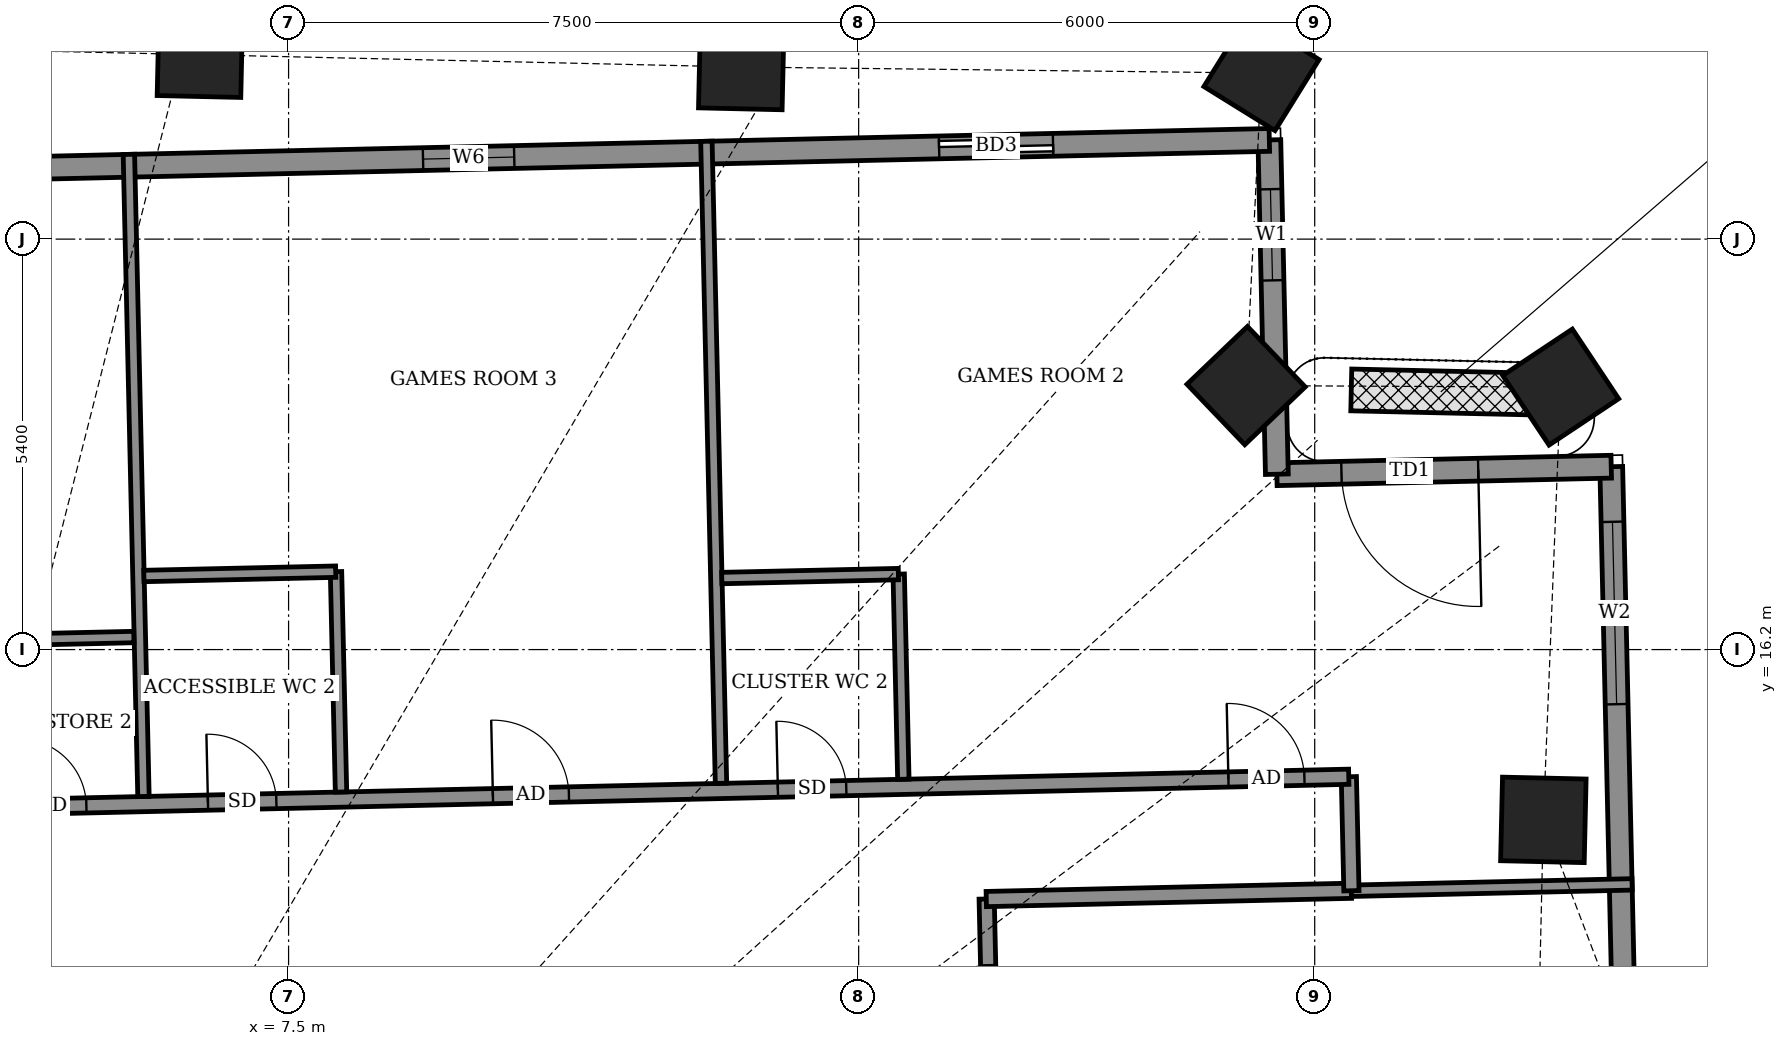
"""IFC4 building model, lengths in metres.
Left out: names, types, materials, properties, quantities, classifications, styles, units other than length and angle.
Written with IfcOpenShell. Run it as: python <this file> out.ifc"""

import sys

from ifc_helpers import new_model, si_unit, direction, frame, frame_2d, origin, origin_2d, place, context, subcontext, project, spatial, rectangle, extrude, element, fill, save


model = new_model("IFC4")
c1 = context("Model", 3, precision=1e-05, world=origin(), true_north=direction((0.0, 1.0)))
c2 = subcontext(c1, "Body", "Model", "MODEL_VIEW")
j1 = project(units=[si_unit("LENGTHUNIT", "METRE"), si_unit("PLANEANGLEUNIT", "RADIAN")], contexts=[c1])
p1 = place(None, origin())
s1 = spatial("IfcSite", under=j1, at=p1, CompositionType="ELEMENT")
p2 = place(p1, origin())
s2 = spatial("IfcBuilding", under=s1, at=p2, CompositionType="ELEMENT")
p3 = place(p2, frame((0.0, 0.0, 226.5)))
s3 = spatial("IfcBuildingStorey", under=s2, at=p3, CompositionType="ELEMENT", Elevation=226.5)
for number, where, z_axis, x_axis in (
    (1, (24.008, 13.959, -0.55), (0.0, 0.0, 1.0), (0.023, 1.0, 0.0)),
    (2, (24.236, 19.653, -0.55), (0.0, 0.0, 1.0), (-0.554, 0.833, 0.0)),
    (3, (20.097, 19.673, -0.55), (0.0, 0.0, 1.0), (-0.691, 0.723, 0.0)),
    (4, (20.3, 23.785, -0.55), (0.0, 0.0, 1.0), (-0.85, 0.527, 0.0)),
    (5, (13.456, 23.864, -0.55), (0.0, 0.0, 1.0), (-1.0, 0.023, 0.0)),
    (6, (6.333, 24.026, -0.55), (0.0, 0.0, 1.0), (-1.0, 0.023, 0.0)),
):
    element("IfcColumn", number, at=place(p3, frame(where, z_axis=z_axis, x_axis=x_axis)), inside=s3, PredefinedType="COLUMN", context=c2, shape_type="SweptSolid", body=[
        extrude(rectangle(XDim=1.1, YDim=1.1, at=origin_2d()), origin(), (0.0, 0.0, 1.0), 4.6),
    ])
p4 = place(p3, frame((25.194, 5.703, 0.0), z_axis=(0.0, 0.0, 1.0), x_axis=(-0.022718397506, 0.999741903901, 0.0)))
e7 = element("IfcWall", 7, at=p4, inside=s3, PredefinedType="SOLIDWALL", context=c2, shape_type="SweptSolid", body=[
    extrude(rectangle(XDim=12.906, YDim=0.3, at=frame_2d((6.453, 0.0))), origin(), (0.0, 0.0, 1.0), 2.55),
])
p5 = place(p4, frame((4.253, 0.0, 0.0)))
e8 = element("IfcOpeningElement", 8, at=p5, cuts=e7, PredefinedType="OPENING", context=c2, shape_type="SweptSolid", body=[
    extrude(rectangle(XDim=1.5, YDim=2.4, at=frame_2d((0.75, 1.2))), frame((0.0, 0.16, 0.0), z_axis=(0.0, -1.0, 0.0), x_axis=(1.0, 0.0, 0.0)), (0.0, 0.0, 1.0), 0.32),
])
p6 = place(p4, frame((9.781, 0.0, 0.9)))
e9 = element("IfcOpeningElement", 9, at=p6, cuts=e7, PredefinedType="OPENING", context=c2, shape_type="SweptSolid", body=[
    extrude(rectangle(XDim=2.4, YDim=1.5, at=frame_2d((1.2, 0.75))), frame((0.0, 0.16, 0.0), z_axis=(0.0, -1.0, 0.0), x_axis=(1.0, 0.0, 0.0)), (0.0, 0.0, 1.0), 0.32),
])
p7 = place(p3, frame((24.901, 18.606, 0.0), z_axis=(0.0, 0.0, 1.0), x_axis=(-0.999747476176, -0.022471846368, 0.0)))
e10 = element("IfcWall", 10, at=p7, inside=s3, PredefinedType="SOLIDWALL", context=c2, shape_type="SweptSolid", body=[
    extrude(rectangle(XDim=4.4, YDim=0.3, at=frame_2d((2.2, 0.0))), origin(), (0.0, 0.0, 1.0), 2.55),
])
p8 = place(p7, frame((1.75, 0.0, 0.0)))
e11 = element("IfcOpeningElement", 11, at=p8, cuts=e10, PredefinedType="OPENING", context=c2, shape_type="SweptSolid", body=[
    extrude(rectangle(XDim=1.8, YDim=2.4, at=frame_2d((0.9, 1.2))), frame((0.0, 0.16, 0.0), z_axis=(0.0, -1.0, 0.0), x_axis=(1.0, 0.0, 0.0)), (0.0, 0.0, 1.0), 0.32),
])
p9 = place(p3, frame((20.502, 18.507, 0.0), z_axis=(0.0, 0.0, 1.0), x_axis=(-0.02247683371, 0.999747364061, 0.0)))
e12 = element("IfcWall", 12, at=p9, inside=s3, PredefinedType="SOLIDWALL", context=c2, shape_type="SweptSolid", body=[
    extrude(rectangle(XDim=4.399, YDim=0.3, at=frame_2d((2.2, 0.0))), origin(), (0.0, 0.0, 1.0), 2.55),
])
p10 = place(p9, frame((2.551, 0.0, 0.9)))
e13 = element("IfcOpeningElement", 13, at=p10, cuts=e12, PredefinedType="OPENING", context=c2, shape_type="SweptSolid", body=[
    extrude(rectangle(XDim=1.2, YDim=1.5, at=frame_2d((0.6, 0.75))), frame((0.0, 0.16, 0.0), z_axis=(0.0, -1.0, 0.0), x_axis=(1.0, 0.0, 0.0)), (0.0, 0.0, 1.0), 0.32),
])
p11 = place(p3, frame((20.403, 22.905, 0.0), z_axis=(0.0, 0.0, 1.0), x_axis=(-0.99974298964, -0.022670568288, 0.0)))
e14 = element("IfcWall", 14, at=p11, inside=s3, PredefinedType="SOLIDWALL", context=c2, shape_type="SweptSolid", body=[
    extrude(rectangle(XDim=44.509, YDim=0.3, at=frame_2d((22.254, 0.0))), origin(), (0.0, 0.0, 1.0), 2.45),
])
p12 = place(p11, frame((2.846, 0.0, 0.0)))
e15 = element("IfcOpeningElement", 15, at=p12, cuts=e14, PredefinedType="OPENING", context=c2, shape_type="SweptSolid", body=[
    extrude(rectangle(XDim=1.5, YDim=2.0, at=frame_2d((0.75, 1.0))), frame((0.0, 0.16, 0.0), z_axis=(0.0, -1.0, 0.0), x_axis=(1.0, 0.0, 0.0)), (0.0, 0.0, 1.0), 0.32),
])
p13 = place(p11, frame((9.937, 0.0, 0.5)))
e16 = element("IfcOpeningElement", 16, at=p13, cuts=e14, PredefinedType="OPENING", context=c2, shape_type="SweptSolid", body=[
    extrude(rectangle(XDim=1.2, YDim=1.1, at=frame_2d((0.6, 0.55))), frame((0.0, 0.16, 0.0), z_axis=(0.0, -1.0, 0.0), x_axis=(1.0, 0.0, 0.0)), (0.0, 0.0, 1.0), 0.32),
])
p14 = place(p11, frame((17.433, 0.0, 0.5)))
e17 = element("IfcOpeningElement", 17, at=p14, cuts=e14, PredefinedType="OPENING", context=c2, shape_type="SweptSolid", body=[
    extrude(rectangle(XDim=1.2, YDim=1.1, at=frame_2d((0.6, 0.55))), frame((0.0, 0.16, 0.0), z_axis=(0.0, -1.0, 0.0), x_axis=(1.0, 0.0, 0.0)), (0.0, 0.0, 1.0), 0.32),
])
p15 = place(p11, frame((22.808, 0.0, 0.0)))
e18 = element("IfcOpeningElement", 18, at=p15, cuts=e14, PredefinedType="OPENING", context=c2, shape_type="SweptSolid", body=[
    extrude(rectangle(XDim=1.5, YDim=2.0, at=frame_2d((0.75, 1.0))), frame((0.0, 0.16, 0.0), z_axis=(0.0, -1.0, 0.0), x_axis=(1.0, 0.0, 0.0)), (0.0, 0.0, 1.0), 0.32),
])
p16 = place(p11, frame((27.808, 0.0, 0.0)))
e19 = element("IfcOpeningElement", 19, at=p16, cuts=e14, PredefinedType="OPENING", context=c2, shape_type="SweptSolid", body=[
    extrude(rectangle(XDim=1.5, YDim=2.0, at=frame_2d((0.75, 1.0))), frame((0.0, 0.16, 0.0), z_axis=(0.0, -1.0, 0.0), x_axis=(1.0, 0.0, 0.0)), (0.0, 0.0, 1.0), 0.32),
])
p17 = place(p11, frame((33.483, 0.0, 0.5)))
e20 = element("IfcOpeningElement", 20, at=p17, cuts=e14, PredefinedType="OPENING", context=c2, shape_type="SweptSolid", body=[
    extrude(rectangle(XDim=1.2, YDim=1.1, at=frame_2d((0.6, 0.55))), frame((0.0, 0.16, 0.0), z_axis=(0.0, -1.0, 0.0), x_axis=(1.0, 0.0, 0.0)), (0.0, 0.0, 1.0), 0.32),
])
p18 = place(p11, frame((40.283, 0.0, 0.5)))
e21 = element("IfcOpeningElement", 21, at=p18, cuts=e14, PredefinedType="OPENING", context=c2, shape_type="SweptSolid", body=[
    extrude(rectangle(XDim=1.2, YDim=1.1, at=frame_2d((0.6, 0.55))), frame((0.0, 0.16, 0.0), z_axis=(0.0, -1.0, 0.0), x_axis=(1.0, 0.0, 0.0)), (0.0, 0.0, 1.0), 0.32),
])
p19 = place(p3, frame((21.481, 19.616, 0.0), z_axis=(0.0, 0.0, 1.0), x_axis=(0.999746842804, -0.02250000673, 0.0)))
e22 = element("IfcWall", 22, at=p19, inside=s3, PredefinedType="USERDEFINED", context=c2, shape_type="SweptSolid", body=[
    extrude(rectangle(XDim=2.354, YDim=0.55, at=frame_2d((1.177, 0.0))), origin(), (0.0, 0.0, 1.0), 0.8),
])
p20 = place(p3, frame((16.799, 7.875, 0.0), z_axis=(0.0, 0.0, 1.0), x_axis=(-0.022791754614, 0.999740234222, 0.0)))
e23 = element("IfcWall", 23, at=p20, inside=s3, PredefinedType="PARTITIONING", context=c2, shape_type="SweptSolid", body=[
    extrude(rectangle(XDim=5.045, YDim=0.2, at=frame_2d((2.522, 0.0))), origin(), (0.0, 0.0, 1.0), 2.85),
])
p21 = place(p20, frame((3.274, 0.0, 0.0)))
e24 = element("IfcOpeningElement", 24, at=p21, cuts=e23, PredefinedType="OPENING", context=c2, shape_type="SweptSolid", body=[
    extrude(rectangle(XDim=0.9, YDim=2.1, at=frame_2d((0.45, 1.05))), frame((0.0, 0.11, 0.0), z_axis=(0.0, -1.0, 0.0), x_axis=(1.0, 0.0, 0.0)), (0.0, 0.0, 1.0), 0.22),
])
p22 = place(p3, frame((16.679, 12.918, 0.0), z_axis=(0.0, 0.0, 1.0), x_axis=(0.999741966705, 0.022715633565, 0.0)))
e25 = element("IfcWall", 25, at=p22, inside=s3, PredefinedType="PARTITIONING", context=c2, shape_type="SweptSolid", body=[
    extrude(rectangle(XDim=4.804, YDim=0.2, at=frame_2d((2.402, 0.0))), origin(), (0.0, 0.0, 1.0), 2.85),
])
p23 = place(p3, frame((21.482, 13.027, 0.0), z_axis=(0.0, 0.0, 1.0), x_axis=(0.999741664963, 0.022728909705, 0.0)))
e26 = element("IfcWall", 26, at=p23, inside=s3, PredefinedType="PARTITIONING", context=c2, shape_type="SweptSolid", body=[
    extrude(rectangle(XDim=3.695, YDim=0.15, at=frame_2d((1.848, 0.0))), origin(), (0.0, 0.0, 1.0), 2.55),
])
p24 = place(p3, frame((21.483, 13.027, 0.0), z_axis=(0.0, 0.0, 1.0), x_axis=(-0.022617910375, 0.999744182344, 0.0)))
e27 = element("IfcWall", 27, at=p24, inside=s3, PredefinedType="PARTITIONING", context=c2, shape_type="SweptSolid", body=[
    extrude(rectangle(XDim=1.5, YDim=0.2, at=frame_2d((0.75, 0.0))), origin(), (0.0, 0.0, 1.0), 4.05),
])
p25 = place(p3, frame((-27.652, 13.413, 0.0), z_axis=(0.0, 0.0, 1.0), x_axis=(0.999742712492, 0.022682786863, 0.0)))
e28 = element("IfcWall", 28, at=p25, inside=s3, PredefinedType="PARTITIONING", context=c2, shape_type="SweptSolid", body=[
    extrude(rectangle(XDim=49.113, YDim=0.2, at=frame_2d((24.556, 0.0))), origin(), (0.0, 0.0, 1.0), 2.45),
])
p26 = place(p25, frame((47.529, 0.0, 0.0)))
e29 = element("IfcOpeningElement", 29, at=p26, cuts=e28, PredefinedType="OPENING", context=c2, shape_type="SweptSolid", body=[
    extrude(rectangle(XDim=1.0, YDim=2.1, at=frame_2d((0.5, 1.05))), frame((0.0, 0.11, 0.0), z_axis=(0.0, -1.0, 0.0), x_axis=(1.0, 0.0, 0.0)), (0.0, 0.0, 1.0), 0.22),
])
p27 = place(p25, frame((41.6, 0.0, 0.0)))
e30 = element("IfcOpeningElement", 30, at=p27, cuts=e28, PredefinedType="OPENING", context=c2, shape_type="SweptSolid", body=[
    extrude(rectangle(XDim=0.9, YDim=2.1, at=frame_2d((0.45, 1.05))), frame((0.0, 0.11, 0.0), z_axis=(0.0, -1.0, 0.0), x_axis=(1.0, 0.0, 0.0)), (0.0, 0.0, 1.0), 0.22),
])
p28 = place(p25, frame((37.85, 0.0, 0.0)))
e31 = element("IfcOpeningElement", 31, at=p28, cuts=e28, PredefinedType="OPENING", context=c2, shape_type="SweptSolid", body=[
    extrude(rectangle(XDim=1.0, YDim=2.1, at=frame_2d((0.5, 1.05))), frame((0.0, 0.11, 0.0), z_axis=(0.0, -1.0, 0.0), x_axis=(1.0, 0.0, 0.0)), (0.0, 0.0, 1.0), 0.22),
])
p29 = place(p25, frame((34.1, 0.0, 0.0)))
e32 = element("IfcOpeningElement", 32, at=p29, cuts=e28, PredefinedType="OPENING", context=c2, shape_type="SweptSolid", body=[
    extrude(rectangle(XDim=0.9, YDim=2.1, at=frame_2d((0.45, 1.05))), frame((0.0, 0.11, 0.0), z_axis=(0.0, -1.0, 0.0), x_axis=(1.0, 0.0, 0.0)), (0.0, 0.0, 1.0), 0.22),
])
p30 = place(p25, frame((28.525, 0.0, 0.0)))
e33 = element("IfcOpeningElement", 33, at=p30, cuts=e28, PredefinedType="OPENING", context=c2, shape_type="SweptSolid", body=[
    extrude(rectangle(XDim=1.0, YDim=2.1, at=frame_2d((0.5, 1.05))), frame((0.0, 0.11, 0.0), z_axis=(0.0, -1.0, 0.0), x_axis=(1.0, 0.0, 0.0)), (0.0, 0.0, 1.0), 0.22),
])
p31 = place(p25, frame((31.6, 0.0, 0.0)))
e34 = element("IfcOpeningElement", 34, at=p31, cuts=e28, PredefinedType="OPENING", context=c2, shape_type="SweptSolid", body=[
    extrude(rectangle(XDim=0.9, YDim=2.1, at=frame_2d((0.45, 1.05))), frame((0.0, 0.11, 0.0), z_axis=(0.0, -1.0, 0.0), x_axis=(1.0, 0.0, 0.0)), (0.0, 0.0, 1.0), 0.22),
])
p32 = place(p25, frame((25.45, 0.0, 0.0)))
e35 = element("IfcOpeningElement", 35, at=p32, cuts=e28, PredefinedType="OPENING", context=c2, shape_type="SweptSolid", body=[
    extrude(rectangle(XDim=0.9, YDim=2.1, at=frame_2d((0.45, 1.05))), frame((0.0, 0.11, 0.0), z_axis=(0.0, -1.0, 0.0), x_axis=(1.0, 0.0, 0.0)), (0.0, 0.0, 1.0), 0.22),
])
p33 = place(p25, frame((18.05, 0.0, 0.0)))
e36 = element("IfcOpeningElement", 36, at=p33, cuts=e28, PredefinedType="OPENING", context=c2, shape_type="SweptSolid", body=[
    extrude(rectangle(XDim=0.9, YDim=2.1, at=frame_2d((0.45, 1.05))), frame((0.0, 0.11, 0.0), z_axis=(0.0, -1.0, 0.0), x_axis=(1.0, 0.0, 0.0)), (0.0, 0.0, 1.0), 0.22),
])
p34 = place(p25, frame((14.975, 0.0, 0.0)))
e37 = element("IfcOpeningElement", 37, at=p34, cuts=e28, PredefinedType="OPENING", context=c2, shape_type="SweptSolid", body=[
    extrude(rectangle(XDim=1.0, YDim=2.1, at=frame_2d((0.5, 1.05))), frame((0.0, 0.11, 0.0), z_axis=(0.0, -1.0, 0.0), x_axis=(1.0, 0.0, 0.0)), (0.0, 0.0, 1.0), 0.22),
])
p35 = place(p25, frame((12.0, 0.0, 0.0)))
e38 = element("IfcOpeningElement", 38, at=p35, cuts=e28, PredefinedType="OPENING", context=c2, shape_type="SweptSolid", body=[
    extrude(rectangle(XDim=0.9, YDim=2.1, at=frame_2d((0.45, 1.05))), frame((0.0, 0.11, 0.0), z_axis=(0.0, -1.0, 0.0), x_axis=(1.0, 0.0, 0.0)), (0.0, 0.0, 1.0), 0.22),
])
p36 = place(p25, frame((5.354, 0.0, 0.0)))
e39 = element("IfcOpeningElement", 39, at=p36, cuts=e28, PredefinedType="OPENING", context=c2, shape_type="SweptSolid", body=[
    extrude(rectangle(XDim=1.0, YDim=2.1, at=frame_2d((0.5, 1.05))), frame((0.0, 0.11, 0.0), z_axis=(0.0, -1.0, 0.0), x_axis=(1.0, 0.0, 0.0)), (0.0, 0.0, 1.0), 0.22),
])
p37 = place(p3, frame((5.591, 14.267, 0.0), z_axis=(0.0, 0.0, 1.0), x_axis=(-0.022737812646, 0.999741462517, 0.0)))
e40 = element("IfcWall", 40, at=p37, inside=s3, PredefinedType="PARTITIONING", context=c2, shape_type="SweptSolid", body=[
    extrude(rectangle(XDim=8.45, YDim=0.15, at=frame_2d((4.225, 0.0))), origin(), (0.0, 0.0, 1.0), 2.75),
])
p38 = place(p3, frame((8.19, 14.326, 0.0), z_axis=(0.0, 0.0, 1.0), x_axis=(-0.022730967319, 0.999741618182, 0.0)))
e41 = element("IfcWall", 41, at=p38, inside=s3, PredefinedType="PARTITIONING", context=c2, shape_type="SweptSolid", body=[
    extrude(rectangle(XDim=2.9, YDim=0.15, at=frame_2d((1.45, 0.0))), origin(), (0.0, 0.0, 1.0), 2.55),
])
p39 = place(p3, frame((13.189, 14.44, 0.0), z_axis=(0.0, 0.0, 1.0), x_axis=(-0.022711559831, 0.999742059258, 0.0)))
e42 = element("IfcWall", 42, at=p39, inside=s3, PredefinedType="PARTITIONING", context=c2, shape_type="SweptSolid", body=[
    extrude(rectangle(XDim=8.449, YDim=0.15, at=frame_2d((4.225, 0.0))), origin(), (0.0, 0.0, 1.0), 2.55),
])
p40 = place(p3, frame((15.588, 14.494, 0.0), z_axis=(0.0, 0.0, 1.0), x_axis=(-0.022515998029, 0.999746482781, 0.0)))
e43 = element("IfcWall", 43, at=p40, inside=s3, PredefinedType="PARTITIONING", context=c2, shape_type="SweptSolid", body=[
    extrude(rectangle(XDim=2.7, YDim=0.15, at=frame_2d((1.35, 0.0))), origin(), (0.0, 0.0, 1.0), 2.65),
])
p41 = place(p3, frame((3.14, 16.312, 0.0), z_axis=(0.0, 0.0, 1.0), x_axis=(0.99974031529, 0.022788198363, 0.0)))
e44 = element("IfcWall", 44, at=p41, inside=s3, PredefinedType="PARTITIONING", context=c2, shape_type="SweptSolid", body=[
    extrude(rectangle(XDim=2.325, YDim=0.15, at=frame_2d((1.162, 0.0))), origin(), (0.0, 0.0, 1.0), 2.75),
])
p42 = place(p3, frame((13.199, 17.141, 0.0), z_axis=(0.0, 0.0, 1.0), x_axis=(0.999749744571, 0.022370700241, 0.0)))
e45 = element("IfcWall", 45, at=p42, inside=s3, PredefinedType="PARTITIONING", context=c2, shape_type="SweptSolid", body=[
    extrude(rectangle(XDim=2.324, YDim=0.15, at=frame_2d((1.162, 0.0))), origin(), (0.0, 0.0, 1.0), 2.65),
])
p43 = place(p3, frame((5.596, 17.168, 0.0), z_axis=(0.0, 0.0, 1.0), x_axis=(0.999743977673, 0.022626955293, 0.0)))
e46 = element("IfcWall", 46, at=p43, inside=s3, PredefinedType="PARTITIONING", context=c2, shape_type="SweptSolid", body=[
    extrude(rectangle(XDim=2.525, YDim=0.15, at=frame_2d((1.262, 0.0))), origin(), (0.0, 0.0, 1.0), 4.05),
])
p44 = place(p6, origin())
e47 = element("IfcWindow", 47, at=p44, inside=s3, PartitioningType="DOUBLE_PANEL_VERTICAL", PredefinedType="WINDOW", context=c2, shape_type="SweptSolid", body=[
    extrude(rectangle(XDim=2.4, YDim=1.5, at=frame_2d((1.2, 0.75))), frame((0.0, 0.03, 0.0), z_axis=(0.0, -1.0, 0.0), x_axis=(1.0, 0.0, 0.0)), (0.0, 0.0, 1.0), 0.06),
])
fill(e9, e47)
p45 = place(p8, origin())
e48 = element("IfcDoor", 48, at=p45, inside=s3, OperationType="DOUBLE_DOOR_SINGLE_SWING", PredefinedType="DOOR", context=c2, shape_type="SweptSolid", body=[
    extrude(rectangle(XDim=1.8, YDim=2.4, at=frame_2d((0.9, 1.2))), frame((0.0, 0.025, 0.0), z_axis=(0.0, -1.0, 0.0), x_axis=(1.0, 0.0, 0.0)), (0.0, 0.0, 1.0), 0.05),
])
fill(e11, e48)
p46 = place(p10, origin())
e49 = element("IfcWindow", 49, at=p46, inside=s3, PartitioningType="SINGLE_PANEL", PredefinedType="WINDOW", context=c2, shape_type="SweptSolid", body=[
    extrude(rectangle(XDim=1.2, YDim=1.5, at=frame_2d((0.6, 0.75))), frame((0.0, 0.03, 0.0), z_axis=(0.0, -1.0, 0.0), x_axis=(1.0, 0.0, 0.0)), (0.0, 0.0, 1.0), 0.06),
])
fill(e13, e49)
p47 = place(p12, origin())
e50 = element("IfcDoor", 50, at=p47, inside=s3, OperationType="SLIDING_TO_LEFT", PredefinedType="DOOR", context=c2, shape_type="SweptSolid", body=[
    extrude(rectangle(XDim=1.5, YDim=2.0, at=frame_2d((0.75, 1.0))), frame((0.0, 0.025, 0.0), z_axis=(0.0, -1.0, 0.0), x_axis=(1.0, 0.0, 0.0)), (0.0, 0.0, 1.0), 0.05),
])
fill(e15, e50)
p48 = place(p13, origin())
e51 = element("IfcWindow", 51, at=p48, inside=s3, PartitioningType="SINGLE_PANEL", PredefinedType="WINDOW", context=c2, shape_type="SweptSolid", body=[
    extrude(rectangle(XDim=1.2, YDim=1.1, at=frame_2d((0.6, 0.55))), frame((0.0, 0.03, 0.0), z_axis=(0.0, -1.0, 0.0), x_axis=(1.0, 0.0, 0.0)), (0.0, 0.0, 1.0), 0.06),
])
fill(e16, e51)
p49 = place(p21, origin())
e52 = element("IfcDoor", 52, at=p49, inside=s3, OperationType="SINGLE_SWING_RIGHT", PredefinedType="DOOR", context=c2, shape_type="SweptSolid", body=[
    extrude(rectangle(XDim=0.9, YDim=2.1, at=frame_2d((0.45, 1.05))), frame((0.0, 0.025, 0.0), z_axis=(0.0, -1.0, 0.0), x_axis=(1.0, 0.0, 0.0)), (0.0, 0.0, 1.0), 0.05),
])
fill(e24, e52)
p50 = place(p26, origin())
e53 = element("IfcDoor", 53, at=p50, inside=s3, OperationType="SINGLE_SWING_LEFT", PredefinedType="DOOR", context=c2, shape_type="SweptSolid", body=[
    extrude(rectangle(XDim=1.0, YDim=2.1, at=frame_2d((0.5, 1.05))), frame((0.0, 0.025, 0.0), z_axis=(0.0, -1.0, 0.0), x_axis=(1.0, 0.0, 0.0)), (0.0, 0.0, 1.0), 0.05),
])
fill(e29, e53)
p51 = place(p27, origin())
e54 = element("IfcDoor", 54, at=p51, inside=s3, OperationType="SINGLE_SWING_RIGHT", PredefinedType="DOOR", context=c2, shape_type="SweptSolid", body=[
    extrude(rectangle(XDim=0.9, YDim=2.1, at=frame_2d((0.45, 1.05))), frame((0.0, 0.025, 0.0), z_axis=(0.0, -1.0, 0.0), x_axis=(1.0, 0.0, 0.0)), (0.0, 0.0, 1.0), 0.05),
])
fill(e30, e54)
p52 = place(p28, origin())
e55 = element("IfcDoor", 55, at=p52, inside=s3, OperationType="SINGLE_SWING_RIGHT", PredefinedType="DOOR", context=c2, shape_type="SweptSolid", body=[
    extrude(rectangle(XDim=1.0, YDim=2.1, at=frame_2d((0.5, 1.05))), frame((0.0, 0.025, 0.0), z_axis=(0.0, -1.0, 0.0), x_axis=(1.0, 0.0, 0.0)), (0.0, 0.0, 1.0), 0.05),
])
fill(e31, e55)
p53 = place(p29, origin())
e56 = element("IfcDoor", 56, at=p53, inside=s3, OperationType="SINGLE_SWING_LEFT", PredefinedType="DOOR", context=c2, shape_type="SweptSolid", body=[
    extrude(rectangle(XDim=0.9, YDim=2.1, at=frame_2d((0.45, 1.05))), frame((0.0, 0.025, 0.0), z_axis=(0.0, -1.0, 0.0), x_axis=(1.0, 0.0, 0.0)), (0.0, 0.0, 1.0), 0.05),
])
fill(e32, e56)
p54 = place(p31, origin())
e57 = element("IfcDoor", 57, at=p54, inside=s3, OperationType="SINGLE_SWING_RIGHT", PredefinedType="DOOR", context=c2, shape_type="SweptSolid", body=[
    extrude(rectangle(XDim=0.9, YDim=2.1, at=frame_2d((0.45, 1.05))), frame((0.0, 0.025, 0.0), z_axis=(0.0, -1.0, 0.0), x_axis=(1.0, 0.0, 0.0)), (0.0, 0.0, 1.0), 0.05),
])
fill(e34, e57)
save(model, sys.argv[1])
